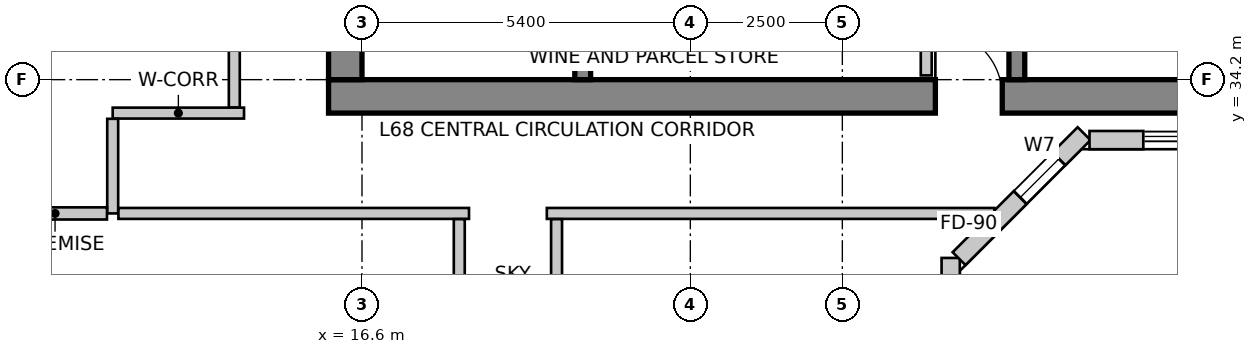
"""IFC4 building model, lengths in metres.
Left out: names, types, materials, properties, quantities, classifications, styles, units other than length and angle.
Written with IfcOpenShell. Run it as: python <this file> out.ifc"""

import sys

from ifc_helpers import new_model, si_unit, direction, frame, frame_2d, origin, place, context, subcontext, project, spatial, rectangle, extrude, source, transform, mapped, element, fill, save


model = new_model("IFC4")
c1 = context("Model", 3, precision=1e-05, world=origin(), true_north=direction((0.0, 1.0)))
c2 = subcontext(c1, "Body", "Model", "MODEL_VIEW")
j1 = project(units=[si_unit("LENGTHUNIT", "METRE"), si_unit("PLANEANGLEUNIT", "RADIAN")], contexts=[c1])
p1 = place(None, origin())
s1 = spatial("IfcSite", under=j1, at=p1, CompositionType="ELEMENT")
p2 = place(p1, origin())
s2 = spatial("IfcBuilding", under=s1, at=p2, CompositionType="ELEMENT")
p3 = place(p2, frame((0.0, 0.0, 267.3)))
s3 = spatial("IfcBuildingStorey", under=s2, at=p3, CompositionType="ELEMENT", Elevation=267.3)
p4 = place(p3, frame((16.05, 33.925, 0.0), z_axis=(0.0, 0.0, 1.0), x_axis=(1.0, 0.0, 0.0)))
e1 = element("IfcWall", 1, at=p4, inside=s3, PredefinedType="SHEAR", context=c2, shape_type="SweptSolid", body=[
    extrude(rectangle(XDim=15.5, YDim=0.55, at=frame_2d((7.75, 0.0))), origin(), (0.0, 0.0, 1.0), 3.6),
])
m1 = source(origin(), c2, "Body", "SweptSolid", [
    extrude(rectangle(XDim=1.1, YDim=2.15, at=frame_2d((0.55, 1.075))), frame((0.0, 0.285, 0.0), z_axis=(0.0, -1.0, 0.0), x_axis=(1.0, 0.0, 0.0)), (0.0, 0.0, 1.0), 0.57),
])
p5 = place(p4, frame((9.98, 0.0, 0.0)))
e2 = element("IfcOpeningElement", 2, at=p5, cuts=e1, PredefinedType="OPENING", context=c2, shape_type="MappedRepresentation", body=[
    mapped(m1, transform((0.0, 0.0, 0.0), scale=1.0)),
])
p6 = place(p3, frame((16.325, 34.2, 0.0), z_axis=(0.0, 0.0, 1.0), x_axis=(0.0, 1.0, 0.0)))
e3 = element("IfcWall", 3, at=p6, inside=s3, PredefinedType="SHEAR", context=c2, shape_type="SweptSolid", body=[
    extrude(rectangle(XDim=11.4, YDim=0.55, at=frame_2d((5.7, 0.0))), origin(), (0.0, 0.0, 1.0), 3.6),
])
p7 = place(p6, frame((7.15, 0.0, 0.0)))
e4 = element("IfcOpeningElement", 4, at=p7, cuts=e3, PredefinedType="OPENING", context=c2, shape_type="MappedRepresentation", body=[
    mapped(m1, transform((0.0, 0.0, 0.0), scale=1.0)),
])
p8 = place(p3, frame((20.23, 34.2, 0.0), z_axis=(0.0, 0.0, 1.0), x_axis=(0.0, 1.0, 0.0)))
e5 = element("IfcWall", 5, at=p8, inside=s3, PredefinedType="SHEAR", context=c2, shape_type="SweptSolid", body=[
    extrude(rectangle(XDim=9.06, YDim=0.26, at=frame_2d((4.53, 0.0))), origin(), (0.0, 0.0, 1.0), 3.6),
])
m2 = source(origin(), c2, "Body", "SweptSolid", [
    extrude(rectangle(XDim=1.1, YDim=2.15, at=frame_2d((0.55, 1.075))), frame((0.0, 0.14, 0.0), z_axis=(0.0, -1.0, 0.0), x_axis=(1.0, 0.0, 0.0)), (0.0, 0.0, 1.0), 0.28),
])
p9 = place(p8, frame((7.45, 0.0, 0.0)))
e6 = element("IfcOpeningElement", 6, at=p9, cuts=e5, PredefinedType="OPENING", context=c2, shape_type="MappedRepresentation", body=[
    mapped(m2, transform((0.0, 0.0, 0.0), scale=1.0)),
])
p10 = place(p3, frame((27.37, 34.2, 0.0), z_axis=(0.0, 0.0, 1.0), x_axis=(0.0, 1.0, 0.0)))
e7 = element("IfcWall", 7, at=p10, inside=s3, PredefinedType="SHEAR", context=c2, shape_type="SweptSolid", body=[
    extrude(rectangle(XDim=9.06, YDim=0.26, at=frame_2d((4.53, 0.0))), origin(), (0.0, 0.0, 1.0), 3.6),
])
p11 = place(p10, frame((7.45, 0.0, 0.0)))
e8 = element("IfcOpeningElement", 8, at=p11, cuts=e7, PredefinedType="OPENING", context=c2, shape_type="MappedRepresentation", body=[
    mapped(m2, transform((0.0, 0.0, 0.0), scale=1.0)),
])
p12 = place(p3, frame((26.282, 21.557, 0.0), z_axis=(0.0, 0.0, 1.0), x_axis=(0.0, 1.0, 0.0)))
e9 = element("IfcWall", 9, at=p12, inside=s3, PredefinedType="SOLIDWALL", context=c2, shape_type="SweptSolid", body=[
    extrude(rectangle(XDim=9.711, YDim=0.3, at=frame_2d((4.855, 0.0))), origin(), (0.0, 0.0, 1.0), 3.35),
])
m3 = source(origin(), c2, "Body", "SweptSolid", [
    extrude(rectangle(XDim=2.4, YDim=2.2, at=frame_2d((1.2, 1.1))), frame((0.0, 0.16, 0.0), z_axis=(0.0, -1.0, 0.0), x_axis=(1.0, 0.0, 0.0)), (0.0, 0.0, 1.0), 0.32),
])
p13 = place(p12, frame((1.388, 0.0, 0.85)))
e10 = element("IfcOpeningElement", 10, at=p13, cuts=e9, PredefinedType="OPENING", context=c2, shape_type="MappedRepresentation", body=[
    mapped(m3, transform((0.0, 0.0, 0.0), scale=1.0)),
])
m4 = source(origin(), c2, "Body", "SweptSolid", [
    extrude(rectangle(XDim=2.1, YDim=2.0, at=frame_2d((1.05, 1.0))), frame((0.0, 0.16, 0.0), z_axis=(0.0, -1.0, 0.0), x_axis=(1.0, 0.0, 0.0)), (0.0, 0.0, 1.0), 0.32),
])
p14 = place(p12, frame((6.073, 0.0, 0.85)))
e11 = element("IfcOpeningElement", 11, at=p14, cuts=e9, PredefinedType="OPENING", context=c2, shape_type="MappedRepresentation", body=[
    mapped(m4, transform((0.0, 0.0, 0.0), scale=1.0)),
])
p15 = place(p3, frame((26.42, 31.256, 0.0), z_axis=(0.0, 0.0, 1.0), x_axis=(0.707106781187, 0.707106781187, 0.0)))
e12 = element("IfcWall", 12, at=p15, inside=s3, PredefinedType="SOLIDWALL", context=c2, shape_type="SweptSolid", body=[
    extrude(rectangle(XDim=2.907, YDim=0.3, at=frame_2d((1.454, 0.0))), origin(), (0.0, 0.0, 1.0), 3.35),
])
m5 = source(origin(), c2, "Body", "SweptSolid", [
    extrude(rectangle(XDim=0.9, YDim=1.6, at=frame_2d((0.45, 0.8))), frame((0.0, 0.16, 0.0), z_axis=(0.0, -1.0, 0.0), x_axis=(1.0, 0.0, 0.0)), (0.0, 0.0, 1.0), 0.32),
])
p16 = place(p15, frame((1.422, 0.0, 0.85)))
e13 = element("IfcOpeningElement", 13, at=p16, cuts=e12, PredefinedType="OPENING", context=c2, shape_type="MappedRepresentation", body=[
    mapped(m5, transform((0.0, 0.0, 0.0), scale=1.0)),
])
p17 = place(p3, frame((28.565, 33.206, 0.0), z_axis=(0.0, 0.0, 1.0), x_axis=(1.0, 0.0, 0.0)))
e14 = element("IfcWall", 14, at=p17, inside=s3, PredefinedType="SOLIDWALL", context=c2, shape_type="SweptSolid", body=[
    extrude(rectangle(XDim=0.885, YDim=0.3, at=frame_2d((0.442, 0.0))), origin(), (0.0, 0.0, 1.0), 3.35),
])
p18 = place(p3, frame((13.269, 47.134, 0.0), z_axis=(0.0, 0.0, 1.0), x_axis=(-0.3199211297, -0.947444178182, 0.0)))
e15 = element("IfcWall", 15, at=p18, inside=s3, PredefinedType="SOLIDWALL", context=c2, shape_type="SweptSolid", body=[
    extrude(rectangle(XDim=16.132, YDim=0.3, at=frame_2d((8.066, 0.0))), origin(), (0.0, 0.0, 1.0), 3.35),
])
p19 = place(p18, frame((2.435, 0.0, 0.85)))
e16 = element("IfcOpeningElement", 16, at=p19, cuts=e15, PredefinedType="OPENING", context=c2, shape_type="MappedRepresentation", body=[
    mapped(m3, transform((0.0, 0.0, 0.0), scale=1.0)),
])
p20 = place(p18, frame((7.417, 0.0, 0.85)))
e17 = element("IfcOpeningElement", 17, at=p20, cuts=e15, PredefinedType="OPENING", context=c2, shape_type="MappedRepresentation", body=[
    mapped(m4, transform((0.0, 0.0, 0.0), scale=1.0)),
])
p21 = place(p18, frame((12.099, 0.0, 0.85)))
e18 = element("IfcOpeningElement", 18, at=p21, cuts=e15, PredefinedType="OPENING", context=c2, shape_type="MappedRepresentation", body=[
    mapped(m3, transform((0.0, 0.0, 0.0), scale=1.0)),
])
p22 = place(p3, frame((25.88, 35.956, 0.0), z_axis=(0.0, 0.0, 1.0), x_axis=(0.0, -1.0, 0.0)))
e19 = element("IfcWall", 19, at=p22, inside=s3, PredefinedType="PARTITIONING", context=c2, shape_type="SweptSolid", body=[
    extrude(rectangle(XDim=1.686, YDim=0.18, at=frame_2d((0.843, 0.0))), origin(), (0.0, 0.0, 1.0), 2.642),
])
p23 = place(p3, frame((12.5, 33.65, 0.0), z_axis=(0.0, 0.0, 1.0), x_axis=(1.0, 0.0, 0.0)))
e20 = element("IfcWall", 20, at=p23, inside=s3, PredefinedType="PARTITIONING", context=c2, shape_type="SweptSolid", body=[
    extrude(rectangle(XDim=2.16, YDim=0.18, at=frame_2d((1.08, 0.0))), origin(), (0.0, 0.0, 1.0), 3.35),
])
p24 = place(p3, frame((12.5, 32.0, 0.0), z_axis=(0.0, 0.0, 1.0), x_axis=(0.0, 1.0, 0.0)))
e21 = element("IfcWall", 21, at=p24, inside=s3, PredefinedType="PARTITIONING", context=c2, shape_type="SweptSolid", body=[
    extrude(rectangle(XDim=1.556, YDim=0.18, at=frame_2d((0.778, 0.0))), origin(), (0.0, 0.0, 1.0), 3.034),
])
p25 = place(p3, frame((18.36, 32.0, 0.0), z_axis=(0.0, 0.0, 1.0), x_axis=(-1.0, 0.0, 0.0)))
e22 = element("IfcWall", 22, at=p25, inside=s3, PredefinedType="PARTITIONING", context=c2, shape_type="SweptSolid", body=[
    extrude(rectangle(XDim=5.766, YDim=0.18, at=frame_2d((2.883, 0.0))), origin(), (0.0, 0.0, 1.0), 3.034),
])
p26 = place(p3, frame((27.001, 32.0, 0.0), z_axis=(0.0, 0.0, 1.0), x_axis=(-1.0, 0.0, 0.0)))
e23 = element("IfcWall", 23, at=p26, inside=s3, PredefinedType="PARTITIONING", context=c2, shape_type="SweptSolid", body=[
    extrude(rectangle(XDim=7.361, YDim=0.18, at=frame_2d((3.681, 0.0))), origin(), (0.0, 0.0, 1.0), 3.034),
])
p27 = place(p3, frame((14.5, 33.744, 0.0), z_axis=(0.0, 0.0, 1.0), x_axis=(0.0, 1.0, 0.0)))
e24 = element("IfcWall", 24, at=p27, inside=s3, PredefinedType="PARTITIONING", context=c2, shape_type="SweptSolid", body=[
    extrude(rectangle(XDim=12.406, YDim=0.18, at=frame_2d((6.203, 0.0))), origin(), (0.0, 0.0, 1.0), 3.35),
])
m6 = source(origin(), c2, "Body", "SweptSolid", [
    extrude(rectangle(XDim=0.9, YDim=2.15, at=frame_2d((0.45, 1.075))), frame((0.0, 0.1, 0.0), z_axis=(0.0, -1.0, 0.0), x_axis=(1.0, 0.0, 0.0)), (0.0, 0.0, 1.0), 0.2),
])
p28 = place(p27, frame((4.37, 0.0, 0.0)))
e25 = element("IfcOpeningElement", 25, at=p28, cuts=e24, PredefinedType="OPENING", context=c2, shape_type="MappedRepresentation", body=[
    mapped(m6, transform((0.0, 0.0, 0.0), scale=1.0)),
])
p29 = place(p3, frame((12.406, 32.0, 0.0), z_axis=(0.0, 0.0, 1.0), x_axis=(-1.0, 0.0, 0.0)))
e26 = element("IfcWall", 26, at=p29, inside=s3, PredefinedType="PARTITIONING", context=c2, shape_type="SweptSolid", body=[
    extrude(rectangle(XDim=1.708, YDim=0.2, at=frame_2d((0.854, 0.0))), origin(), (0.0, 0.0, 1.0), 2.642),
])
p30 = place(p3, frame((18.2, 24.872, 0.0), z_axis=(0.0, 0.0, 1.0), x_axis=(0.0, 1.0, 0.0)))
e27 = element("IfcWall", 27, at=p30, inside=s3, PredefinedType="PARTITIONING", context=c2, shape_type="SweptSolid", body=[
    extrude(rectangle(XDim=7.034, YDim=0.18, at=frame_2d((3.517, 0.0))), origin(), (0.0, 0.0, 1.0), 2.922),
])
p31 = place(p30, frame((3.067, 0.0, 0.0)))
e28 = element("IfcOpeningElement", 28, at=p31, cuts=e27, PredefinedType="OPENING", context=c2, shape_type="MappedRepresentation", body=[
    mapped(m6, transform((0.0, 0.0, 0.0), scale=1.0)),
])
p32 = place(p3, frame((19.8, 31.906, 0.0), z_axis=(0.0, 0.0, 1.0), x_axis=(0.0, -1.0, 0.0)))
e29 = element("IfcWall", 29, at=p32, inside=s3, PredefinedType="PARTITIONING", context=c2, shape_type="SweptSolid", body=[
    extrude(rectangle(XDim=10.841, YDim=0.18, at=frame_2d((5.42, 0.0))), origin(), (0.0, 0.0, 1.0), 2.922),
])
p33 = place(p32, frame((4.97, 0.0, 0.0)))
e30 = element("IfcOpeningElement", 30, at=p33, cuts=e29, PredefinedType="OPENING", context=c2, shape_type="MappedRepresentation", body=[
    mapped(m6, transform((0.0, 0.0, 0.0), scale=1.0)),
])
m7 = source(origin(), c2, "Body", "SweptSolid", [
    extrude(rectangle(XDim=0.9, YDim=1.6, at=frame_2d((0.45, 0.8))), frame((0.0, -0.015, 0.0), z_axis=(0.0, -1.0, 0.0), x_axis=(1.0, 0.0, 0.0)), (0.0, 0.0, 1.0), 0.06),
])
p34 = place(p16, origin())
e31 = element("IfcWindow", 31, at=p34, inside=s3, PartitioningType="SINGLE_PANEL", PredefinedType="WINDOW", context=c2, shape_type="MappedRepresentation", body=[
    mapped(m7, transform((0.0, 0.0, 0.0), scale=1.0)),
])
fill(e13, e31)
m8 = source(origin(), c2, "Body", "SweptSolid", [
    extrude(rectangle(XDim=1.1, YDim=2.15, at=frame_2d((0.55, 1.075))), frame((0.0, 0.025, 0.0), z_axis=(0.0, -1.0, 0.0), x_axis=(1.0, 0.0, 0.0)), (0.0, 0.0, 1.0), 0.05),
])
p35 = place(p5, origin())
e32 = element("IfcDoor", 32, at=p35, inside=s3, OperationType="SINGLE_SWING_LEFT", PredefinedType="DOOR", context=c2, shape_type="MappedRepresentation", body=[
    mapped(m8, transform((0.0, 0.0, 0.0), scale=1.0)),
])
fill(e2, e32)
save(model, sys.argv[1])
